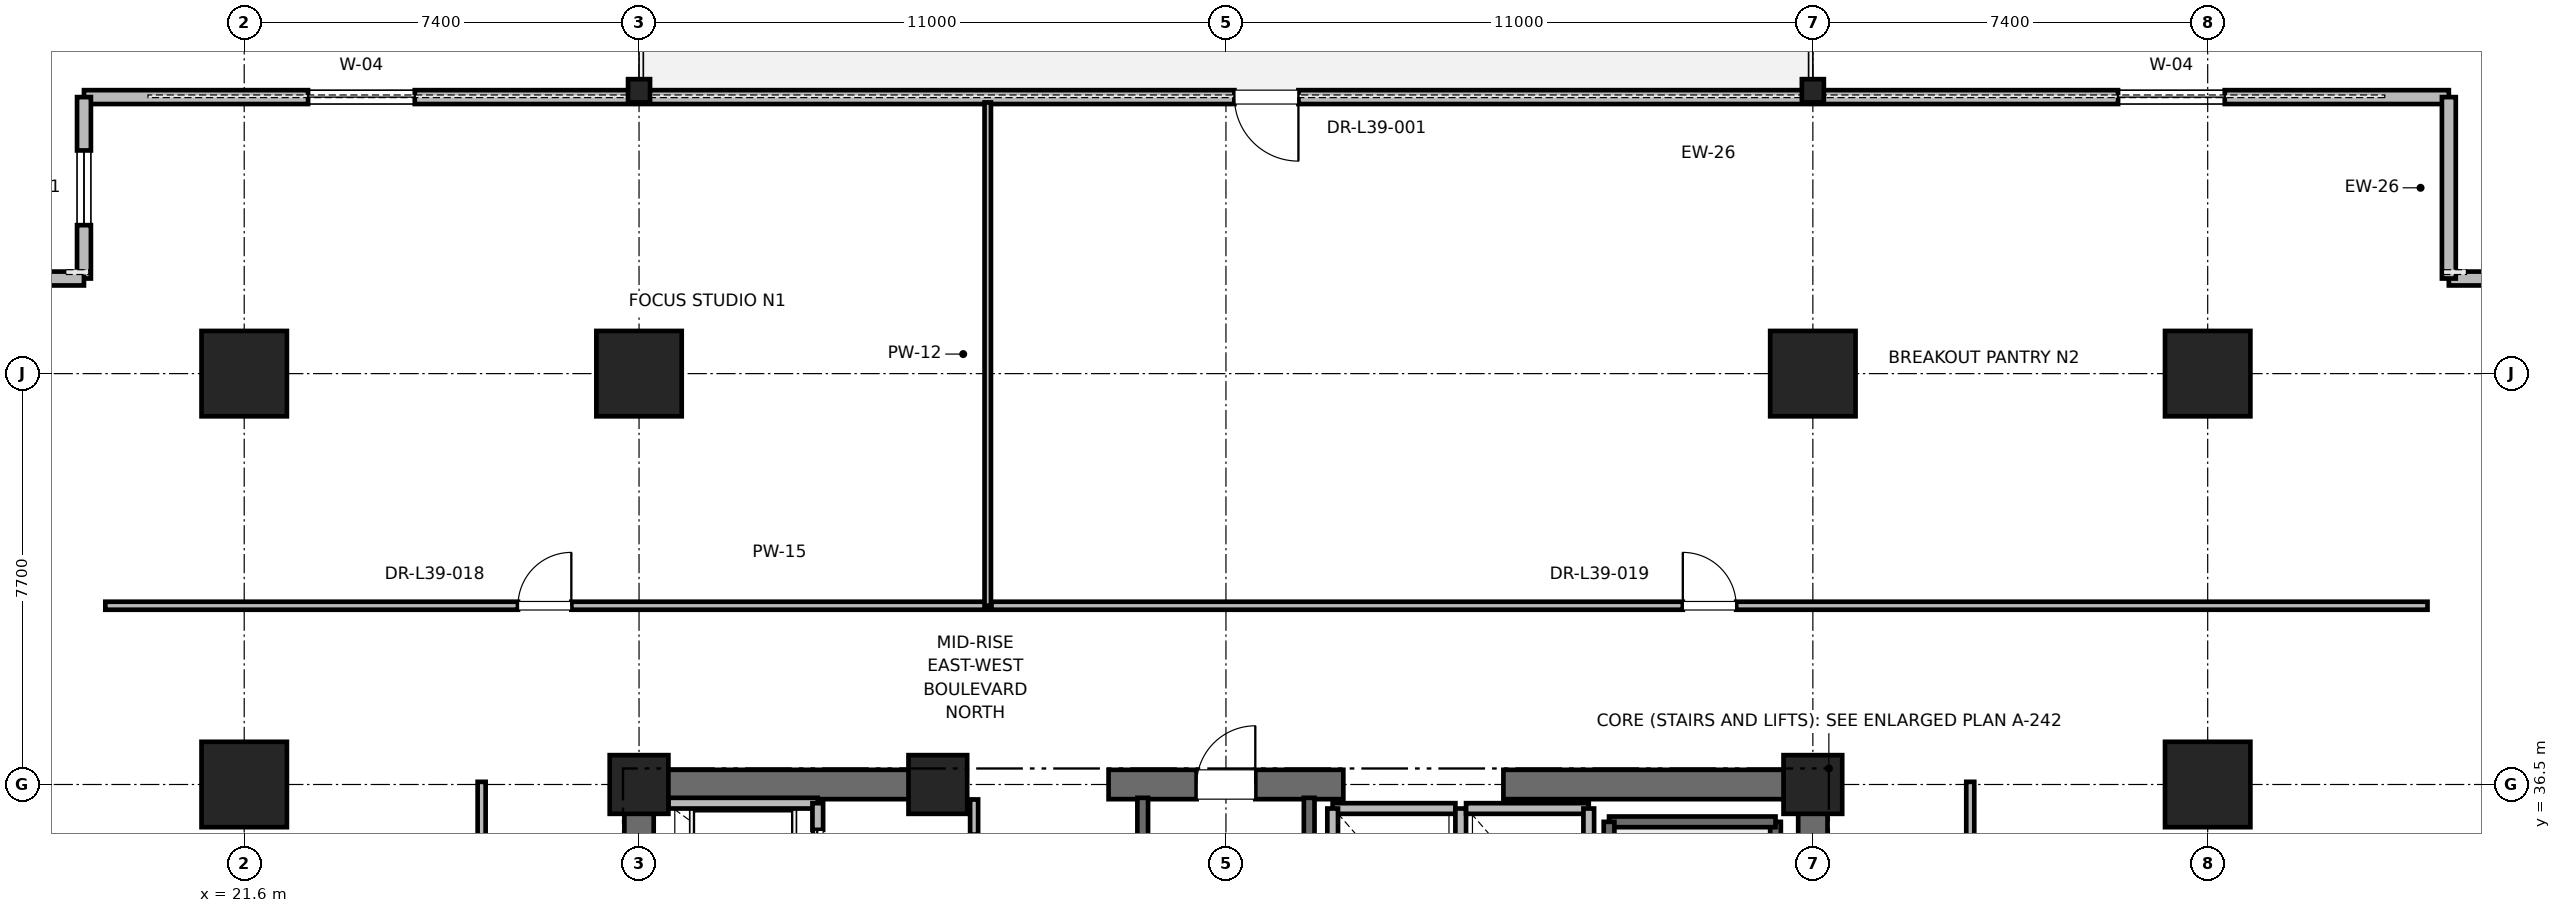
"""IFC4 building model, lengths in metres.
Left out: names, types, materials, properties, quantities, classifications, styles, units other than length and angle.
Written with IfcOpenShell. Run it as: python <this file> out.ifc"""

import sys

from ifc_helpers import new_model, si_unit, direction, frame, frame_2d, origin, origin_2d, place, context, subcontext, project, spatial, rectangle, i_section, extrude, element, fill, save


model = new_model("IFC4")
c1 = context("Model", 3, precision=1e-05, world=origin(), true_north=direction((0.0, 1.0)))
c2 = subcontext(c1, "Body", "Model", "MODEL_VIEW")
j1 = project(units=[si_unit("LENGTHUNIT", "METRE"), si_unit("PLANEANGLEUNIT", "RADIAN")], contexts=[c1])
p1 = place(None, origin())
s1 = spatial("IfcSite", under=j1, at=p1, CompositionType="ELEMENT")
p2 = place(p1, origin())
s2 = spatial("IfcBuilding", under=s1, at=p2, CompositionType="ELEMENT")
p3 = place(p2, frame((0.0, 0.0, 168.4)))
s3 = spatial("IfcBuildingStorey", under=s2, at=p3, CompositionType="ELEMENT", Elevation=168.4)
for number, where, z_axis, x_axis in (
    (1, (29.0, 44.2, 0.0), (0.0, 0.0, 1.0), (1.0, 0.0, 0.0)),
    (2, (51.0, 44.2, 0.0), (0.0, 0.0, 1.0), (1.0, 0.0, 0.0)),
    (3, (21.6, 36.5, 0.0), (0.0, 0.0, 1.0), (1.0, 0.0, 0.0)),
    (4, (58.4, 36.5, 0.0), (0.0, 0.0, 1.0), (1.0, 0.0, 0.0)),
    (5, (21.6, 44.2, 0.0), (0.0, 0.0, 1.0), (1.0, 0.0, 0.0)),
    (6, (58.4, 44.2, 0.0), (0.0, 0.0, 1.0), (1.0, 0.0, 0.0)),
):
    element("IfcColumn", number, at=place(p3, frame(where, z_axis=z_axis, x_axis=x_axis)), inside=s3, PredefinedType="COLUMN", context=c2, shape_type="SweptSolid", body=[
        extrude(rectangle(XDim=1.6, YDim=1.6, at=origin_2d()), origin(), (0.0, 0.0, 1.0), 4.0),
    ])
for number, where, z_axis, x_axis in (
    (7, (29.0, 49.5, 0.0), (0.0, 0.0, 1.0), (1.0, 0.0, 0.0)),
    (8, (51.0, 49.5, 0.0), (0.0, 0.0, 1.0), (1.0, 0.0, 0.0)),
):
    element("IfcColumn", number, at=place(p3, frame(where, z_axis=z_axis, x_axis=x_axis)), inside=s3, PredefinedType="COLUMN", context=c2, shape_type="SweptSolid", body=[
        extrude(i_section(OverallWidth=0.412, OverallDepth=0.437, WebThickness=0.036, FlangeThickness=0.058, FilletRadius=0.015, at=origin_2d()), origin(), (0.0, 0.0, 1.0), 4.0),
    ])
for number, where, z_axis, x_axis in (
    (9, (29.0, 36.5, 0.0), (0.0, 0.0, 1.0), (1.0, 0.0, 0.0)),
    (10, (51.0, 36.5, 0.0), (0.0, 0.0, 1.0), (1.0, 0.0, 0.0)),
    (11, (34.6, 36.5, 0.0), (0.0, 0.0, 1.0), (1.0, 0.0, 0.0)),
):
    element("IfcColumn", number, at=place(p3, frame(where, z_axis=z_axis, x_axis=x_axis)), inside=s3, PredefinedType="PILASTER", context=c2, shape_type="SweptSolid", body=[
        extrude(rectangle(XDim=1.1, YDim=1.1, at=origin_2d()), origin(), (0.0, 0.0, 1.0), 4.0),
    ])
p4 = place(p3, frame((29.0, 36.5, 0.0), z_axis=(0.0, 0.0, 1.0), x_axis=(1.0, 0.0, 0.0)))
e12 = element("IfcWall", 12, at=p4, inside=s3, PredefinedType="SHEAR", context=c2, shape_type="SweptSolid", body=[
    extrude(rectangle(XDim=5.8, YDim=0.55, at=frame_2d((2.9, 0.0))), origin(), (0.0, 0.0, 1.0), 3.775),
])
p5 = place(p3, frame((37.8, 36.5, 0.0), z_axis=(0.0, 0.0, 1.0), x_axis=(1.0, 0.0, 0.0)))
e13 = element("IfcWall", 13, at=p5, inside=s3, PredefinedType="SHEAR", context=c2, shape_type="SweptSolid", body=[
    extrude(rectangle(XDim=4.4, YDim=0.55, at=frame_2d((2.2, 0.0))), origin(), (0.0, 0.0, 1.0), 3.775),
])
p6 = place(p5, frame((1.65, 0.0, 0.0)))
e14 = element("IfcOpeningElement", 14, at=p6, cuts=e13, PredefinedType="OPENING", context=c2, shape_type="SweptSolid", body=[
    extrude(rectangle(XDim=1.1, YDim=2.15, at=frame_2d((0.55, 1.075))), frame((0.0, 0.275, 0.0), z_axis=(0.0, -1.0, 0.0), x_axis=(1.0, 0.0, 0.0)), (0.0, 0.0, 1.0), 0.55),
])
for number, where, z_axis, x_axis in (
    (15, (45.2, 36.5, 0.0), (0.0, 0.0, 1.0), (1.0, 0.0, 0.0)),
    (16, (29.0, 30.7, 0.0), (0.0, 0.0, 1.0), (0.0, 1.0, 0.0)),
):
    element("IfcWall", number, at=place(p3, frame(where, z_axis=z_axis, x_axis=x_axis)), inside=s3, PredefinedType="SHEAR", context=c2, shape_type="SweptSolid", body=[
        extrude(rectangle(XDim=5.8, YDim=0.55, at=frame_2d((2.9, 0.0))), origin(), (0.0, 0.0, 1.0), 3.775),
    ])
p7 = place(p3, frame((51.0, 27.7, 0.0), z_axis=(0.0, 0.0, 1.0), x_axis=(0.0, 1.0, 0.0)))
e17 = element("IfcWall", 17, at=p7, inside=s3, PredefinedType="SHEAR", context=c2, shape_type="SweptSolid", body=[
    extrude(rectangle(XDim=8.8, YDim=0.55, at=frame_2d((4.4, 0.0))), origin(), (0.0, 0.0, 1.0), 3.775),
])
p8 = place(p3, frame((62.92, 49.382, 0.0), z_axis=(0.0, 0.0, 1.0), x_axis=(-1.0, 0.0, 0.0)))
e18 = element("IfcWall", 18, at=p8, inside=s3, PredefinedType="PARAPET", context=c2, shape_type="SweptSolid", body=[
    extrude(rectangle(XDim=44.323, YDim=0.26, at=frame_2d((22.162, 0.0))), origin(), (0.0, 0.0, 1.0), 2.97),
])
p9 = place(p8, frame((4.2, 0.0, 0.85)))
e19 = element("IfcOpeningElement", 19, at=p9, cuts=e18, PredefinedType="OPENING", context=c2, shape_type="SweptSolid", body=[
    extrude(rectangle(XDim=2.0, YDim=2.3, at=frame_2d((1.0, 1.15))), frame((0.0, 0.13, 0.0), z_axis=(0.0, -1.0, 0.0), x_axis=(1.0, 0.0, 0.0)), (0.0, 0.0, 1.0), 0.26),
])
p10 = place(p8, frame((21.562, 0.0, 0.0)))
e20 = element("IfcOpeningElement", 20, at=p10, cuts=e18, PredefinedType="OPENING", context=c2, shape_type="SweptSolid", body=[
    extrude(rectangle(XDim=1.2, YDim=2.2, at=frame_2d((0.6, 1.1))), frame((0.0, 0.13, 0.0), z_axis=(0.0, -1.0, 0.0), x_axis=(1.0, 0.0, 0.0)), (0.0, 0.0, 1.0), 0.26),
])
p11 = place(p8, frame((38.123, 0.0, 0.85)))
e21 = element("IfcOpeningElement", 21, at=p11, cuts=e18, PredefinedType="OPENING", context=c2, shape_type="SweptSolid", body=[
    extrude(rectangle(XDim=2.0, YDim=2.3, at=frame_2d((1.0, 1.15))), frame((0.0, 0.13, 0.0), z_axis=(0.0, -1.0, 0.0), x_axis=(1.0, 0.0, 0.0)), (0.0, 0.0, 1.0), 0.26),
])
p12 = place(p3, frame((66.72, 45.982, 0.0), z_axis=(0.0, 0.0, 1.0), x_axis=(-1.0, 0.0, 0.0)))
e22 = element("IfcWall", 22, at=p12, inside=s3, PredefinedType="PARAPET", context=c2, shape_type="SweptSolid", body=[
    extrude(rectangle(XDim=3.8, YDim=0.26, at=frame_2d((1.9, 0.0))), origin(), (0.0, 0.0, 1.0), 3.775),
])
p13 = place(p12, frame((1.2, 0.0, 0.85)))
e23 = element("IfcOpeningElement", 23, at=p13, cuts=e22, PredefinedType="OPENING", context=c2, shape_type="SweptSolid", body=[
    extrude(rectangle(XDim=1.4, YDim=2.0, at=frame_2d((0.7, 1.0))), frame((0.0, 0.13, 0.0), z_axis=(0.0, -1.0, 0.0), x_axis=(1.0, 0.0, 0.0)), (0.0, 0.0, 1.0), 0.26),
])
p14 = place(p3, frame((62.92, 45.982, 0.0), z_axis=(0.0, 0.0, 1.0), x_axis=(0.0, 1.0, 0.0)))
e24 = element("IfcWall", 24, at=p14, inside=s3, PredefinedType="PARAPET", context=c2, shape_type="SweptSolid", body=[
    extrude(rectangle(XDim=3.4, YDim=0.26, at=frame_2d((1.7, 0.0))), origin(), (0.0, 0.0, 1.0), 3.775),
])
p15 = place(p3, frame((18.597, 49.382, 0.0), z_axis=(0.0, 0.0, 1.0), x_axis=(0.0, -1.0, 0.0)))
e25 = element("IfcWall", 25, at=p15, inside=s3, PredefinedType="PARAPET", context=c2, shape_type="SweptSolid", body=[
    extrude(rectangle(XDim=3.4, YDim=0.26, at=frame_2d((1.7, 0.0))), origin(), (0.0, 0.0, 1.0), 3.775),
])
p16 = place(p15, frame((1.0, 0.0, 0.85)))
e26 = element("IfcOpeningElement", 26, at=p16, cuts=e25, PredefinedType="OPENING", context=c2, shape_type="SweptSolid", body=[
    extrude(rectangle(XDim=1.4, YDim=2.0, at=frame_2d((0.7, 1.0))), frame((0.0, 0.13, 0.0), z_axis=(0.0, -1.0, 0.0), x_axis=(1.0, 0.0, 0.0)), (0.0, 0.0, 1.0), 0.26),
])
p17 = place(p3, frame((18.597, 45.982, 0.0), z_axis=(0.0, 0.0, 1.0), x_axis=(-1.0, 0.0, 0.0)))
e27 = element("IfcWall", 27, at=p17, inside=s3, PredefinedType="PARAPET", context=c2, shape_type="SweptSolid", body=[
    extrude(rectangle(XDim=3.8, YDim=0.26, at=frame_2d((1.9, 0.0))), origin(), (0.0, 0.0, 1.0), 3.775),
])
p18 = place(p3, frame((50.3, 27.65, 0.0), z_axis=(0.0, 0.0, 1.0), x_axis=(0.0, 1.0, 0.0)))
e28 = element("IfcWall", 28, at=p18, inside=s3, PredefinedType="SOLIDWALL", context=c2, shape_type="SweptSolid", body=[
    extrude(rectangle(XDim=8.15, YDim=0.2, at=frame_2d((4.075, 0.0))), origin(), (0.0, 0.0, 1.0), 3.775),
])
p19 = place(p3, frame((47.18, 35.8, 0.0), z_axis=(0.0, 0.0, 1.0), x_axis=(1.0, 0.0, 0.0)))
e29 = element("IfcWall", 29, at=p19, inside=s3, PredefinedType="SOLIDWALL", context=c2, shape_type="SweptSolid", body=[
    extrude(rectangle(XDim=3.12, YDim=0.2, at=frame_2d((1.56, 0.0))), origin(), (0.0, 0.0, 1.0), 3.775),
])
p20 = place(p3, frame((47.18, 27.62, 0.0), z_axis=(0.0, 0.0, 1.0), x_axis=(0.0, 1.0, 0.0)))
e30 = element("IfcWall", 30, at=p20, inside=s3, PredefinedType="SOLIDWALL", context=c2, shape_type="SweptSolid", body=[
    extrude(rectangle(XDim=8.18, YDim=0.2, at=frame_2d((4.09, 0.0))), origin(), (0.0, 0.0, 1.0), 3.775),
])
p21 = place(p3, frame((38.44, 27.38, 0.0), z_axis=(0.0, 0.0, 1.0), x_axis=(0.0, 1.0, 0.0)))
e31 = element("IfcWall", 31, at=p21, inside=s3, PredefinedType="SOLIDWALL", context=c2, shape_type="SweptSolid", body=[
    extrude(rectangle(XDim=8.87, YDim=0.2, at=frame_2d((4.435, 0.0))), origin(), (0.0, 0.0, 1.0), 3.775),
])
p22 = place(p3, frame((41.56, 27.68, 0.0), z_axis=(0.0, 0.0, 1.0), x_axis=(0.0, 1.0, 0.0)))
e32 = element("IfcWall", 32, at=p22, inside=s3, PredefinedType="SOLIDWALL", context=c2, shape_type="SweptSolid", body=[
    extrude(rectangle(XDim=8.57, YDim=0.2, at=frame_2d((4.285, 0.0))), origin(), (0.0, 0.0, 1.0), 3.775),
])
p23 = place(p3, frame((32.35, 36.15, 0.0), z_axis=(0.0, 0.0, 1.0), x_axis=(-1.0, 0.0, 0.0)))
e33 = element("IfcWall", 33, at=p23, inside=s3, PredefinedType="SOLIDWALL", context=c2, shape_type="SweptSolid", body=[
    extrude(rectangle(XDim=2.8, YDim=0.2, at=frame_2d((1.4, 0.0))), origin(), (0.0, 0.0, 1.0), 2.985),
])
p24 = place(p3, frame((32.35, 34.05, 0.0), z_axis=(0.0, 0.0, 1.0), x_axis=(0.0, 1.0, 0.0)))
e34 = element("IfcWall", 34, at=p24, inside=s3, PredefinedType="SOLIDWALL", context=c2, shape_type="SweptSolid", body=[
    extrude(rectangle(XDim=2.1, YDim=0.2, at=frame_2d((1.05, 0.0))), origin(), (0.0, 0.0, 1.0), 3.775),
])
p25 = place(p24, frame((0.5, 0.0, 0.0)))
e35 = element("IfcOpeningElement", 35, at=p25, cuts=e34, PredefinedType="OPENING", context=c2, shape_type="SweptSolid", body=[
    extrude(rectangle(XDim=1.1, YDim=2.2, at=frame_2d((0.55, 1.1))), frame((0.0, 0.1, 0.0), z_axis=(0.0, -1.0, 0.0), x_axis=(1.0, 0.0, 0.0)), (0.0, 0.0, 1.0), 0.2),
])
p26 = place(p3, frame((44.3, 36.05, 0.0), z_axis=(0.0, 0.0, 1.0), x_axis=(-1.0, 0.0, 0.0)))
e36 = element("IfcWall", 36, at=p26, inside=s3, PredefinedType="SOLIDWALL", context=c2, shape_type="SweptSolid", body=[
    extrude(rectangle(XDim=2.3, YDim=0.2, at=frame_2d((1.15, 0.0))), origin(), (0.0, 0.0, 1.0), 2.755),
])
for number, where, z_axis, x_axis in (
    (37, (42.0, 36.05, 0.0), (0.0, 0.0, 1.0), (0.0, -1.0, 0.0)),
    (38, (44.4, 33.45, 0.0), (0.0, 0.0, 1.0), (0.0, 1.0, 0.0)),
):
    element("IfcWall", number, at=place(p3, frame(where, z_axis=z_axis, x_axis=x_axis)), inside=s3, PredefinedType="SOLIDWALL", context=c2, shape_type="SweptSolid", body=[
        extrude(rectangle(XDim=2.6, YDim=0.2, at=frame_2d((1.3, 0.0))), origin(), (0.0, 0.0, 1.0), 2.755),
    ])
p27 = place(p3, frame((46.8, 36.05, 0.0), z_axis=(0.0, 0.0, 1.0), x_axis=(-1.0, 0.0, 0.0)))
e39 = element("IfcWall", 39, at=p27, inside=s3, PredefinedType="SOLIDWALL", context=c2, shape_type="SweptSolid", body=[
    extrude(rectangle(XDim=2.3, YDim=0.2, at=frame_2d((1.15, 0.0))), origin(), (0.0, 0.0, 1.0), 2.755),
])
p28 = place(p3, frame((46.8, 33.45, 0.0), z_axis=(0.0, 0.0, 1.0), x_axis=(0.0, 1.0, 0.0)))
e40 = element("IfcWall", 40, at=p28, inside=s3, PredefinedType="SOLIDWALL", context=c2, shape_type="SweptSolid", body=[
    extrude(rectangle(XDim=2.6, YDim=0.2, at=frame_2d((1.3, 0.0))), origin(), (0.0, 0.0, 1.0), 3.775),
])
p29 = place(p3, frame((35.28, 33.95, 0.0), z_axis=(0.0, 0.0, 1.0), x_axis=(0.0, 1.0, 0.0)))
e41 = element("IfcWall", 41, at=p29, inside=s3, PredefinedType="PARTITIONING", context=c2, shape_type="SweptSolid", body=[
    extrude(rectangle(XDim=2.27, YDim=0.15, at=frame_2d((1.135, 0.0))), origin(), (0.0, 0.0, 1.0), 2.755),
])
p30 = place(p29, frame((0.66, 0.0, 0.0)))
e42 = element("IfcOpeningElement", 42, at=p30, cuts=e41, PredefinedType="OPENING", context=c2, shape_type="SweptSolid", body=[
    extrude(rectangle(XDim=0.95, YDim=2.15, at=frame_2d((0.475, 1.075))), frame((0.0, 0.075, 0.0), z_axis=(0.0, -1.0, 0.0), x_axis=(1.0, 0.0, 0.0)), (0.0, 0.0, 1.0), 0.15),
])
p31 = place(p3, frame((18.997, 39.85, 0.0), z_axis=(0.0, 0.0, 1.0), x_axis=(1.0, 0.0, 0.0)))
e43 = element("IfcWall", 43, at=p31, inside=s3, PredefinedType="PARTITIONING", context=c2, shape_type="SweptSolid", body=[
    extrude(rectangle(XDim=16.539, YDim=0.15, at=frame_2d((8.269, 0.0))), origin(), (0.0, 0.0, 1.0), 2.85),
])
p32 = place(p31, frame((7.734, 0.0, 0.0)))
e44 = element("IfcOpeningElement", 44, at=p32, cuts=e43, PredefinedType="OPENING", context=c2, shape_type="SweptSolid", body=[
    extrude(rectangle(XDim=1.0, YDim=2.15, at=frame_2d((0.5, 1.075))), frame((0.0, 0.075, 0.0), z_axis=(0.0, -1.0, 0.0), x_axis=(1.0, 0.0, 0.0)), (0.0, 0.0, 1.0), 0.15),
])
p33 = place(p3, frame((35.535, 39.85, 0.0), z_axis=(0.0, 0.0, 1.0), x_axis=(0.0, 1.0, 0.0)))
e45 = element("IfcWall", 45, at=p33, inside=s3, PredefinedType="PARTITIONING", context=c2, shape_type="SweptSolid", body=[
    extrude(rectangle(XDim=9.432, YDim=0.12, at=frame_2d((4.716, 0.0))), origin(), (0.0, 0.0, 1.0), 2.405),
])
p34 = place(p3, frame((35.605, 39.85, 0.0), z_axis=(0.0, 0.0, 1.0), x_axis=(1.0, 0.0, 0.0)))
e46 = element("IfcWall", 46, at=p34, inside=s3, PredefinedType="PARTITIONING", context=c2, shape_type="SweptSolid", body=[
    extrude(rectangle(XDim=26.914, YDim=0.15, at=frame_2d((13.457, 0.0))), origin(), (0.0, 0.0, 1.0), 2.85),
])
p35 = place(p34, frame((12.957, 0.0, 0.0)))
e47 = element("IfcOpeningElement", 47, at=p35, cuts=e46, PredefinedType="OPENING", context=c2, shape_type="SweptSolid", body=[
    extrude(rectangle(XDim=1.0, YDim=2.15, at=frame_2d((0.5, 1.075))), frame((0.0, 0.075, 0.0), z_axis=(0.0, -1.0, 0.0), x_axis=(1.0, 0.0, 0.0)), (0.0, 0.0, 1.0), 0.15),
])
p36 = place(p3, frame((26.05, 31.19, 0.0), z_axis=(0.0, 0.0, 1.0), x_axis=(0.0, 1.0, 0.0)))
e48 = element("IfcWall", 48, at=p36, inside=s3, PredefinedType="PARTITIONING", context=c2, shape_type="SweptSolid", body=[
    extrude(rectangle(XDim=5.36, YDim=0.15, at=frame_2d((2.68, 0.0))), origin(), (0.0, 0.0, 1.0), 2.85),
])
p37 = place(p36, frame((2.105, 0.0, 0.0)))
e49 = element("IfcOpeningElement", 49, at=p37, cuts=e48, PredefinedType="OPENING", context=c2, shape_type="SweptSolid", body=[
    extrude(rectangle(XDim=1.0, YDim=2.15, at=frame_2d((0.5, 1.075))), frame((0.0, 0.075, 0.0), z_axis=(0.0, -1.0, 0.0), x_axis=(1.0, 0.0, 0.0)), (0.0, 0.0, 1.0), 0.15),
])
p38 = place(p3, frame((53.95, 26.122, 0.0), z_axis=(0.0, 0.0, 1.0), x_axis=(0.0, 1.0, 0.0)))
e50 = element("IfcWall", 50, at=p38, inside=s3, PredefinedType="PARTITIONING", context=c2, shape_type="SweptSolid", body=[
    extrude(rectangle(XDim=10.428, YDim=0.15, at=frame_2d((5.214, 0.0))), origin(), (0.0, 0.0, 1.0), 2.85),
])
p39 = place(p38, frame((4.639, 0.0, 0.0)))
e51 = element("IfcOpeningElement", 51, at=p39, cuts=e50, PredefinedType="OPENING", context=c2, shape_type="SweptSolid", body=[
    extrude(rectangle(XDim=1.0, YDim=2.15, at=frame_2d((0.5, 1.075))), frame((0.0, 0.075, 0.0), z_axis=(0.0, -1.0, 0.0), x_axis=(1.0, 0.0, 0.0)), (0.0, 0.0, 1.0), 0.15),
])
p40 = place(p9, origin())
e52 = element("IfcWindow", 52, at=p40, inside=s3, PartitioningType="SINGLE_PANEL", PredefinedType="WINDOW", context=c2, shape_type="SweptSolid", body=[
    extrude(rectangle(XDim=2.0, YDim=2.3, at=frame_2d((1.0, 1.15))), frame((0.0, 0.03, 0.0), z_axis=(0.0, -1.0, 0.0), x_axis=(1.0, 0.0, 0.0)), (0.0, 0.0, 1.0), 0.06),
])
fill(e19, e52)
p41 = place(p10, origin())
e53 = element("IfcDoor", 53, at=p41, inside=s3, OperationType="SINGLE_SWING_LEFT", PredefinedType="DOOR", context=c2, shape_type="SweptSolid", body=[
    extrude(rectangle(XDim=1.2, YDim=2.2, at=frame_2d((0.6, 1.1))), frame((0.0, 0.025, 0.0), z_axis=(0.0, -1.0, 0.0), x_axis=(1.0, 0.0, 0.0)), (0.0, 0.0, 1.0), 0.05),
])
fill(e20, e53)
p42 = place(p11, origin())
e54 = element("IfcWindow", 54, at=p42, inside=s3, PartitioningType="SINGLE_PANEL", PredefinedType="WINDOW", context=c2, shape_type="SweptSolid", body=[
    extrude(rectangle(XDim=2.0, YDim=2.3, at=frame_2d((1.0, 1.15))), frame((0.0, 0.03, 0.0), z_axis=(0.0, -1.0, 0.0), x_axis=(1.0, 0.0, 0.0)), (0.0, 0.0, 1.0), 0.06),
])
fill(e21, e54)
p43 = place(p16, origin())
e55 = element("IfcWindow", 55, at=p43, inside=s3, PartitioningType="SINGLE_PANEL", PredefinedType="WINDOW", context=c2, shape_type="SweptSolid", body=[
    extrude(rectangle(XDim=1.4, YDim=2.0, at=frame_2d((0.7, 1.0))), frame((0.0, 0.03, 0.0), z_axis=(0.0, -1.0, 0.0), x_axis=(1.0, 0.0, 0.0)), (0.0, 0.0, 1.0), 0.06),
])
fill(e26, e55)
p44 = place(p6, origin())
e56 = element("IfcDoor", 56, at=p44, inside=s3, OperationType="SINGLE_SWING_RIGHT", PredefinedType="DOOR", context=c2, shape_type="SweptSolid", body=[
    extrude(rectangle(XDim=1.1, YDim=2.15, at=frame_2d((0.55, 1.075))), frame((0.0, 0.025, 0.0), z_axis=(0.0, -1.0, 0.0), x_axis=(1.0, 0.0, 0.0)), (0.0, 0.0, 1.0), 0.05),
])
fill(e14, e56)
p45 = place(p25, origin())
e57 = element("IfcDoor", 57, at=p45, inside=s3, OperationType="SLIDING_TO_RIGHT", PredefinedType="DOOR", context=c2, shape_type="SweptSolid", body=[
    extrude(rectangle(XDim=1.1, YDim=2.2, at=frame_2d((0.55, 1.1))), frame((0.0, 0.025, 0.0), z_axis=(0.0, -1.0, 0.0), x_axis=(1.0, 0.0, 0.0)), (0.0, 0.0, 1.0), 0.05),
])
fill(e35, e57)
p46 = place(p32, origin())
e58 = element("IfcDoor", 58, at=p46, inside=s3, OperationType="SINGLE_SWING_RIGHT", PredefinedType="DOOR", context=c2, shape_type="SweptSolid", body=[
    extrude(rectangle(XDim=1.0, YDim=2.15, at=frame_2d((0.5, 1.075))), frame((0.0, 0.025, 0.0), z_axis=(0.0, -1.0, 0.0), x_axis=(1.0, 0.0, 0.0)), (0.0, 0.0, 1.0), 0.05),
])
fill(e44, e58)
p47 = place(p35, origin())
e59 = element("IfcDoor", 59, at=p47, inside=s3, OperationType="SINGLE_SWING_LEFT", PredefinedType="DOOR", context=c2, shape_type="SweptSolid", body=[
    extrude(rectangle(XDim=1.0, YDim=2.15, at=frame_2d((0.5, 1.075))), frame((0.0, 0.025, 0.0), z_axis=(0.0, -1.0, 0.0), x_axis=(1.0, 0.0, 0.0)), (0.0, 0.0, 1.0), 0.05),
])
fill(e47, e59)
save(model, sys.argv[1])
